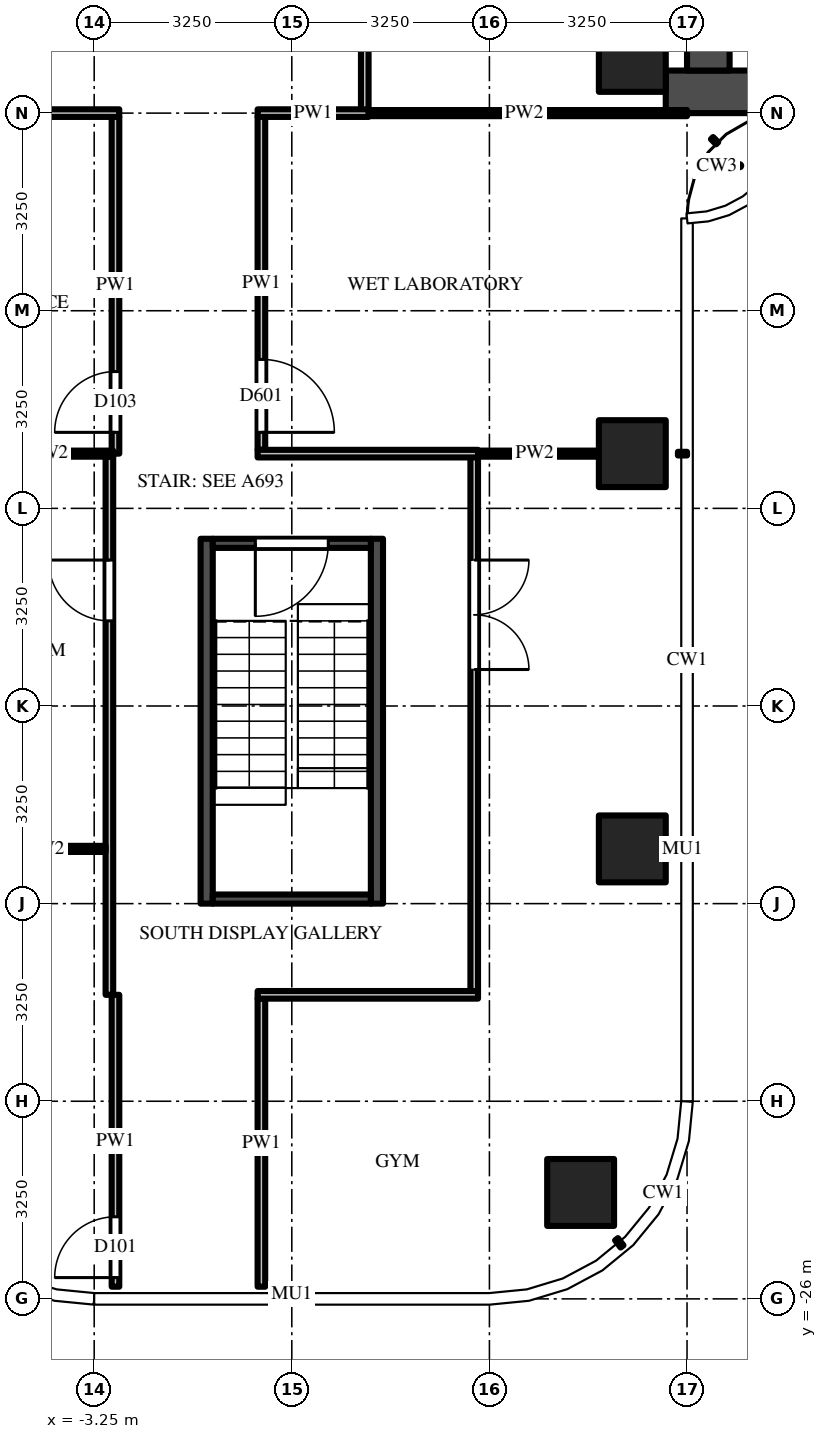
"""IFC4 building model, lengths in metres.
Left out: names, types, materials, properties, quantities, classifications, styles, units other than length and angle.
Written with IfcOpenShell. Run it as: python <this file> out.ifc"""

import sys

from ifc_helpers import new_model, si_unit, direction, frame, frame_2d, origin, origin_2d, place, context, subcontext, project, spatial, rectangle, extrude, source, transform, mapped, element, fill, save


model = new_model("IFC4")
c1 = context("Model", 3, precision=1e-05, world=origin(), true_north=direction((0.0, 1.0)))
c2 = subcontext(c1, "Body", "Model", "MODEL_VIEW")
j1 = project(units=[si_unit("LENGTHUNIT", "METRE"), si_unit("PLANEANGLEUNIT", "RADIAN")], contexts=[c1])
p1 = place(None, origin())
s1 = spatial("IfcSite", under=j1, at=p1, CompositionType="ELEMENT")
p2 = place(p1, origin())
s2 = spatial("IfcBuilding", under=s1, at=p2, CompositionType="ELEMENT")
p3 = place(p2, frame((0.0, 0.0, 232.4)))
s3 = spatial("IfcBuildingStorey", under=s2, at=p3, CompositionType="ELEMENT", Elevation=232.4)
m1 = source(origin(), c2, "Body", "SweptSolid", [
    extrude(rectangle(XDim=1.1, YDim=1.1, at=origin_2d()), origin(), (0.0, 0.0, 1.0), 3.9),
])
for number, where, z_axis, x_axis in (
    (1, (5.6, -5.6, 0.0), (0.0, 0.0, 1.0), (1.0, 0.0, 0.0)),
    (2, (5.6, -12.1, 0.0), (0.0, 0.0, 1.0), (1.0, 0.0, 0.0)),
    (3, (5.6, -18.6, 0.0), (0.0, 0.0, 1.0), (1.0, 0.0, 0.0)),
    (4, (4.75, -24.25, 0.0), (0.0, 0.0, 1.0), (1.0, 0.0, 0.0)),
):
    element("IfcColumn", number, at=place(p3, frame(where, z_axis=z_axis, x_axis=x_axis)), inside=s3, PredefinedType="COLUMN", context=c2, shape_type="MappedRepresentation", body=[
        mapped(m1, transform((0.0, 0.0, 0.0))),
    ])
m2 = source(origin(), c2, "Body", "SweptSolid", [
    extrude(rectangle(XDim=16.6, YDim=0.7, at=frame_2d((8.3, 0.0))), origin(), (0.0, 0.0, 1.0), 3.7),
])
p4 = place(p3, frame((6.15, -6.15, 0.0), z_axis=(0.0, 0.0, 1.0), x_axis=(1.0, 0.0, 0.0)))
e5 = element("IfcWall", 5, at=p4, inside=s3, PredefinedType="SHEAR", context=c2, shape_type="MappedRepresentation", body=[
    mapped(m2, transform((0.0, 0.0, 0.0))),
])
m3 = source(origin(), c2, "Body", "SweptSolid", [
    extrude(rectangle(XDim=9.05, YDim=0.7, at=frame_2d((4.525, 0.0))), origin(), (0.0, 0.0, 1.0), 3.7),
])
p5 = place(p3, frame((6.85, -5.8, 0.0), z_axis=(0.0, 0.0, 1.0), x_axis=(0.0, 1.0, 0.0)))
e6 = element("IfcWall", 6, at=p5, inside=s3, PredefinedType="SHEAR", context=c2, shape_type="MappedRepresentation", body=[
    mapped(m3, transform((0.0, 0.0, 0.0))),
])
m4 = source(origin(), c2, "Body", "SweptSolid", [
    extrude(rectangle(XDim=1.8, YDim=2.1, at=frame_2d((0.9, 1.05))), frame((0.0, 0.36, 0.0), z_axis=(0.0, -1.0, 0.0), x_axis=(1.0, 0.0, 0.0)), (0.0, 0.0, 1.0), 0.72),
])
p6 = place(p5, frame((3.15, 0.0, 0.0)))
e7 = element("IfcOpeningElement", 7, at=p6, cuts=e6, PredefinedType="OPENING", context=c2, shape_type="MappedRepresentation", body=[
    mapped(m4, transform((0.0, 0.0, 0.0))),
])
m5 = source(origin(), c2, "Body", "SweptSolid", [
    extrude(rectangle(XDim=6.0, YDim=0.2, at=frame_2d((3.0, 0.0))), origin(), (0.0, 0.0, 1.0), 3.7),
])
for number, where, z_axis, x_axis in (
    (8, (1.4, -13.5, 0.0), (0.0, 0.0, 1.0), (0.0, -1.0, 0.0)),
    (9, (-1.4, -13.5, 0.0), (0.0, 0.0, 1.0), (0.0, -1.0, 0.0)),
):
    element("IfcWall", number, at=place(p3, frame(where, z_axis=z_axis, x_axis=x_axis)), inside=s3, PredefinedType="SHEAR", context=c2, shape_type="MappedRepresentation", body=[
        mapped(m5, transform((0.0, 0.0, 0.0))),
    ])
m6 = source(origin(), c2, "Body", "SweptSolid", [
    extrude(rectangle(XDim=2.6, YDim=0.15, at=frame_2d((1.3, 0.0))), origin(), (0.0, 0.0, 1.0), 3.7),
])
p7 = place(p3, frame((1.3, -13.575, 0.0), z_axis=(0.0, 0.0, 1.0), x_axis=(-1.0, 0.0, 0.0)))
e10 = element("IfcWall", 10, at=p7, inside=s3, PredefinedType="SHEAR", context=c2, shape_type="MappedRepresentation", body=[
    mapped(m6, transform((0.0, 0.0, 0.0))),
])
m7 = source(origin(), c2, "Body", "SweptSolid", [
    extrude(rectangle(XDim=1.2, YDim=2.1, at=frame_2d((0.6, 1.05))), frame((0.0, 0.085, 0.0), z_axis=(0.0, -1.0, 0.0), x_axis=(1.0, 0.0, 0.0)), (0.0, 0.0, 1.0), 0.17),
])
p8 = place(p7, frame((0.7, 0.0, 0.0)))
e11 = element("IfcOpeningElement", 11, at=p8, cuts=e10, PredefinedType="OPENING", context=c2, shape_type="MappedRepresentation", body=[
    mapped(m7, transform((0.0, 0.0, 0.0))),
])
p9 = place(p3, frame((1.3, -19.425, 0.0), z_axis=(0.0, 0.0, 1.0), x_axis=(-1.0, 0.0, 0.0)))
e12 = element("IfcWall", 12, at=p9, inside=s3, PredefinedType="SHEAR", context=c2, shape_type="MappedRepresentation", body=[
    mapped(m6, transform((0.0, 0.0, 0.0))),
])
m8 = source(origin(), c2, "Body", "SweptSolid", [
    extrude(rectangle(XDim=8.85, YDim=0.125, at=frame_2d((4.425, 0.0))), origin(), (0.0, 0.0, 1.0), 2.997),
])
p10 = place(p3, frame((-3.0, -21.0, 0.0), z_axis=(0.0, 0.0, 1.0), x_axis=(0.0, 1.0, 0.0)))
e13 = element("IfcWall", 13, at=p10, inside=s3, PredefinedType="PARTITIONING", context=c2, shape_type="MappedRepresentation", body=[
    mapped(m8, transform((0.0, 0.0, 0.0))),
])
m9 = source(origin(), c2, "Body", "SweptSolid", [
    extrude(rectangle(XDim=1.0, YDim=2.1, at=frame_2d((0.5, 1.05))), frame((0.0, 0.073, 0.0), z_axis=(0.0, -1.0, 0.0), x_axis=(1.0, 0.0, 0.0)), (0.0, 0.0, 1.0), 0.145),
])
p11 = place(p10, frame((6.15, 0.0, 0.0)))
e14 = element("IfcOpeningElement", 14, at=p11, cuts=e13, PredefinedType="OPENING", context=c2, shape_type="MappedRepresentation", body=[
    mapped(m9, transform((0.0, 0.0, 0.0))),
])
m10 = source(origin(), c2, "Body", "SweptSolid", [
    extrude(rectangle(XDim=4.8, YDim=0.125, at=frame_2d((2.4, 0.0))), origin(), (0.0, 0.0, 1.0), 2.78),
])
p12 = place(p3, frame((-2.9, -25.8, 0.0), z_axis=(0.0, 0.0, 1.0), x_axis=(0.0, 1.0, 0.0)))
e15 = element("IfcWall", 15, at=p12, inside=s3, PredefinedType="PARTITIONING", context=c2, shape_type="MappedRepresentation", body=[
    mapped(m10, transform((0.0, 0.0, 0.0))),
])
p13 = place(p12, frame((0.15, 0.0, 0.0)))
e16 = element("IfcOpeningElement", 16, at=p13, cuts=e15, PredefinedType="OPENING", context=c2, shape_type="MappedRepresentation", body=[
    mapped(m9, transform((0.0, 0.0, 0.0))),
])
m11 = source(origin(), c2, "Body", "SweptSolid", [
    extrude(rectangle(XDim=5.538, YDim=0.125, at=frame_2d((2.769, 0.0))), origin(), (0.0, 0.0, 1.0), 2.997),
])
p14 = place(p3, frame((-2.9, -12.1, 0.0), z_axis=(0.0, 0.0, 1.0), x_axis=(0.0, 1.0, 0.0)))
e17 = element("IfcWall", 17, at=p14, inside=s3, PredefinedType="PARTITIONING", context=c2, shape_type="MappedRepresentation", body=[
    mapped(m11, transform((0.0, 0.0, 0.0))),
])
p15 = place(p14, frame((0.35, 0.0, 0.0)))
e18 = element("IfcOpeningElement", 18, at=p15, cuts=e17, PredefinedType="OPENING", context=c2, shape_type="MappedRepresentation", body=[
    mapped(m9, transform((0.0, 0.0, 0.0))),
])
m12 = source(origin(), c2, "Body", "SweptSolid", [
    extrude(rectangle(XDim=4.738, YDim=0.125, at=frame_2d((2.369, 0.0))), origin(), (0.0, 0.0, 1.0), 2.78),
])
p16 = place(p3, frame((-0.5, -21.062, 0.0), z_axis=(0.0, 0.0, 1.0), x_axis=(0.0, -1.0, 0.0)))
e19 = element("IfcWall", 19, at=p16, inside=s3, PredefinedType="PARTITIONING", context=c2, shape_type="MappedRepresentation", body=[
    mapped(m12, transform((0.0, 0.0, 0.0))),
])
m13 = source(origin(), c2, "Body", "SweptSolid", [
    extrude(rectangle(XDim=5.475, YDim=0.125, at=frame_2d((2.738, 0.0))), origin(), (0.0, 0.0, 1.0), 2.997),
])
p17 = place(p3, frame((-0.5, -6.562, 0.0), z_axis=(0.0, 0.0, 1.0), x_axis=(0.0, -1.0, 0.0)))
e20 = element("IfcWall", 20, at=p17, inside=s3, PredefinedType="PARTITIONING", context=c2, shape_type="MappedRepresentation", body=[
    mapped(m13, transform((0.0, 0.0, 0.0))),
])
m14 = source(origin(), c2, "Body", "SweptSolid", [
    extrude(rectangle(XDim=1.2, YDim=2.1, at=frame_2d((0.6, 1.05))), frame((0.0, 0.073, 0.0), z_axis=(0.0, -1.0, 0.0), x_axis=(1.0, 0.0, 0.0)), (0.0, 0.0, 1.0), 0.145),
])
p18 = place(p17, frame((3.988, 0.0, 0.0)))
e21 = element("IfcOpeningElement", 21, at=p18, cuts=e20, PredefinedType="OPENING", context=c2, shape_type="MappedRepresentation", body=[
    mapped(m14, transform((0.0, 0.0, 0.0))),
])
m15 = source(origin(), c2, "Body", "SweptSolid", [
    extrude(rectangle(XDim=3.137, YDim=0.125, at=frame_2d((1.569, 0.0))), origin(), (0.0, 0.0, 1.0), 2.997),
])
p19 = place(p3, frame((1.2, -3.312, 0.0), z_axis=(0.0, 0.0, 1.0), x_axis=(0.0, -1.0, 0.0)))
e22 = element("IfcWall", 22, at=p19, inside=s3, PredefinedType="PARTITIONING", context=c2, shape_type="MappedRepresentation", body=[
    mapped(m15, transform((0.0, 0.0, 0.0))),
])
m16 = source(origin(), c2, "Body", "SweptSolid", [
    extrude(rectangle(XDim=8.788, YDim=0.125, at=frame_2d((4.394, 0.0))), origin(), (0.0, 0.0, 1.0), 2.997),
])
p20 = place(p3, frame((3.0, -12.15, 0.0), z_axis=(0.0, 0.0, 1.0), x_axis=(0.0, -1.0, 0.0)))
e23 = element("IfcWall", 23, at=p20, inside=s3, PredefinedType="PARTITIONING", context=c2, shape_type="MappedRepresentation", body=[
    mapped(m16, transform((0.0, 0.0, 0.0))),
])
m17 = source(origin(), c2, "Body", "SweptSolid", [
    extrude(rectangle(XDim=1.8, YDim=2.1, at=frame_2d((0.9, 1.05))), frame((0.0, 0.073, 0.0), z_axis=(0.0, -1.0, 0.0), x_axis=(1.0, 0.0, 0.0)), (0.0, 0.0, 1.0), 0.145),
])
p21 = place(p20, frame((1.7, 0.0, 0.0)))
e24 = element("IfcOpeningElement", 24, at=p21, cuts=e23, PredefinedType="OPENING", context=c2, shape_type="MappedRepresentation", body=[
    mapped(m17, transform((0.0, 0.0, 0.0))),
])
m18 = source(origin(), c2, "Body", "SweptSolid", [
    extrude(rectangle(XDim=3.625, YDim=0.125, at=frame_2d((1.812, 0.0))), origin(), (0.0, 0.0, 1.0), 3.7),
])
p22 = place(p3, frame((3.062, -21.0, 0.0), z_axis=(0.0, 0.0, 1.0), x_axis=(-1.0, 0.0, 0.0)))
e25 = element("IfcWall", 25, at=p22, inside=s3, PredefinedType="PARTITIONING", context=c2, shape_type="MappedRepresentation", body=[
    mapped(m18, transform((0.0, 0.0, 0.0))),
])
m19 = source(origin(), c2, "Body", "SweptSolid", [
    extrude(rectangle(XDim=1.988, YDim=0.1, at=frame_2d((0.994, 0.0))), origin(), (0.0, 0.0, 1.0), 3.223),
])
p23 = place(p3, frame((-5.05, -18.6, 0.0), z_axis=(0.0, 0.0, 1.0), x_axis=(1.0, 0.0, 0.0)))
e26 = element("IfcWall", 26, at=p23, inside=s3, PredefinedType="PARTITIONING", context=c2, shape_type="MappedRepresentation", body=[
    mapped(m19, transform((0.0, 0.0, 0.0))),
])
m20 = source(origin(), c2, "Body", "SweptSolid", [
    extrude(rectangle(XDim=2.113, YDim=0.1, at=frame_2d((1.056, 0.0))), origin(), (0.0, 0.0, 1.0), 2.997),
])
for number, where, z_axis, x_axis in (
    (27, (-5.05, -12.1, 0.0), (0.0, 0.0, 1.0), (1.0, 0.0, 0.0)),
    (28, (2.938, -12.1, 0.0), (0.0, 0.0, 1.0), (1.0, 0.0, 0.0)),
):
    element("IfcWall", number, at=place(p3, frame(where, z_axis=z_axis, x_axis=x_axis)), inside=s3, PredefinedType="PARTITIONING", context=c2, shape_type="MappedRepresentation", body=[
        mapped(m20, transform((0.0, 0.0, 0.0))),
    ])
m21 = source(origin(), c2, "Body", "SweptSolid", [
    extrude(rectangle(XDim=3.625, YDim=0.125, at=frame_2d((1.812, 0.0))), origin(), (0.0, 0.0, 1.0), 2.997),
])
p24 = place(p3, frame((-0.562, -12.1, 0.0), z_axis=(0.0, 0.0, 1.0), x_axis=(1.0, 0.0, 0.0)))
e29 = element("IfcWall", 29, at=p24, inside=s3, PredefinedType="PARTITIONING", context=c2, shape_type="MappedRepresentation", body=[
    mapped(m21, transform((0.0, 0.0, 0.0))),
])
m22 = source(origin(), c2, "Body", "SweptSolid", [
    extrude(rectangle(XDim=5.363, YDim=0.1, at=frame_2d((2.681, 0.0))), origin(), (0.0, 0.0, 1.0), 2.78),
])
p25 = place(p3, frame((1.137, -6.5, 0.0), z_axis=(0.0, 0.0, 1.0), x_axis=(1.0, 0.0, 0.0)))
e30 = element("IfcWall", 30, at=p25, inside=s3, PredefinedType="PARTITIONING", context=c2, shape_type="MappedRepresentation", body=[
    mapped(m22, transform((0.0, 0.0, 0.0))),
])
m23 = source(origin(), c2, "Body", "SweptSolid", [
    extrude(rectangle(XDim=3.725, YDim=0.125, at=frame_2d((1.863, 0.0))), origin(), (0.0, 0.0, 1.0), 2.78),
])
p26 = place(p3, frame((-2.837, -6.5, 0.0), z_axis=(0.0, 0.0, 1.0), x_axis=(-1.0, 0.0, 0.0)))
e31 = element("IfcWall", 31, at=p26, inside=s3, PredefinedType="PARTITIONING", context=c2, shape_type="MappedRepresentation", body=[
    mapped(m23, transform((0.0, 0.0, 0.0))),
])
m24 = source(origin(), c2, "Body", "SweptSolid", [
    extrude(rectangle(XDim=1.825, YDim=0.125, at=frame_2d((0.913, 0.0))), origin(), (0.0, 0.0, 1.0), 3.7),
])
p27 = place(p3, frame((1.262, -6.5, 0.0), z_axis=(0.0, 0.0, 1.0), x_axis=(-1.0, 0.0, 0.0)))
e32 = element("IfcWall", 32, at=p27, inside=s3, PredefinedType="PARTITIONING", context=c2, shape_type="MappedRepresentation", body=[
    mapped(m24, transform((0.0, 0.0, 0.0))),
])
m25 = source(origin(), c2, "Body", "SweptSolid", [
    extrude(rectangle(XDim=1.2, YDim=2.1, at=frame_2d((0.6, 1.05))), frame((0.0, 0.025, 0.0), z_axis=(0.0, -1.0, 0.0), x_axis=(1.0, 0.0, 0.0)), (0.0, 0.0, 1.0), 0.05),
])
p28 = place(p8, origin())
e33 = element("IfcDoor", 33, at=p28, inside=s3, OperationType="SINGLE_SWING_RIGHT", PredefinedType="DOOR", context=c2, shape_type="MappedRepresentation", body=[
    mapped(m25, transform((0.0, 0.0, 0.0))),
])
fill(e11, e33)
m26 = source(origin(), c2, "Body", "SweptSolid", [
    extrude(rectangle(XDim=1.0, YDim=2.1, at=frame_2d((0.5, 1.05))), frame((0.0, 0.025, 0.0), z_axis=(0.0, -1.0, 0.0), x_axis=(1.0, 0.0, 0.0)), (0.0, 0.0, 1.0), 0.05),
])
p29 = place(p13, origin())
e34 = element("IfcDoor", 34, at=p29, inside=s3, OperationType="SINGLE_SWING_LEFT", PredefinedType="DOOR", context=c2, shape_type="MappedRepresentation", body=[
    mapped(m26, transform((0.0, 0.0, 0.0))),
])
fill(e16, e34)
m27 = source(origin(), c2, "Body", "SweptSolid", [
    extrude(rectangle(XDim=1.8, YDim=2.1, at=frame_2d((0.9, 1.05))), frame((0.0, 0.025, 0.0), z_axis=(0.0, -1.0, 0.0), x_axis=(1.0, 0.0, 0.0)), (0.0, 0.0, 1.0), 0.05),
])
p30 = place(p21, origin())
e35 = element("IfcDoor", 35, at=p30, inside=s3, OperationType="DOUBLE_DOOR_SINGLE_SWING", PredefinedType="DOOR", context=c2, shape_type="MappedRepresentation", body=[
    mapped(m27, transform((0.0, 0.0, 0.0))),
])
fill(e24, e35)
p31 = place(p11, origin())
e36 = element("IfcDoor", 36, at=p31, inside=s3, OperationType="SINGLE_SWING_RIGHT", PredefinedType="DOOR", context=c2, shape_type="MappedRepresentation", body=[
    mapped(m26, transform((0.0, 0.0, 0.0))),
])
fill(e14, e36)
p32 = place(p15, origin())
e37 = element("IfcDoor", 37, at=p32, inside=s3, OperationType="SINGLE_SWING_LEFT", PredefinedType="DOOR", context=c2, shape_type="MappedRepresentation", body=[
    mapped(m26, transform((0.0, 0.0, 0.0))),
])
fill(e18, e37)
p33 = place(p18, origin())
e38 = element("IfcDoor", 38, at=p33, inside=s3, OperationType="SINGLE_SWING_RIGHT", PredefinedType="DOOR", context=c2, shape_type="MappedRepresentation", body=[
    mapped(m25, transform((0.0, 0.0, 0.0))),
])
fill(e21, e38)
save(model, sys.argv[1])
